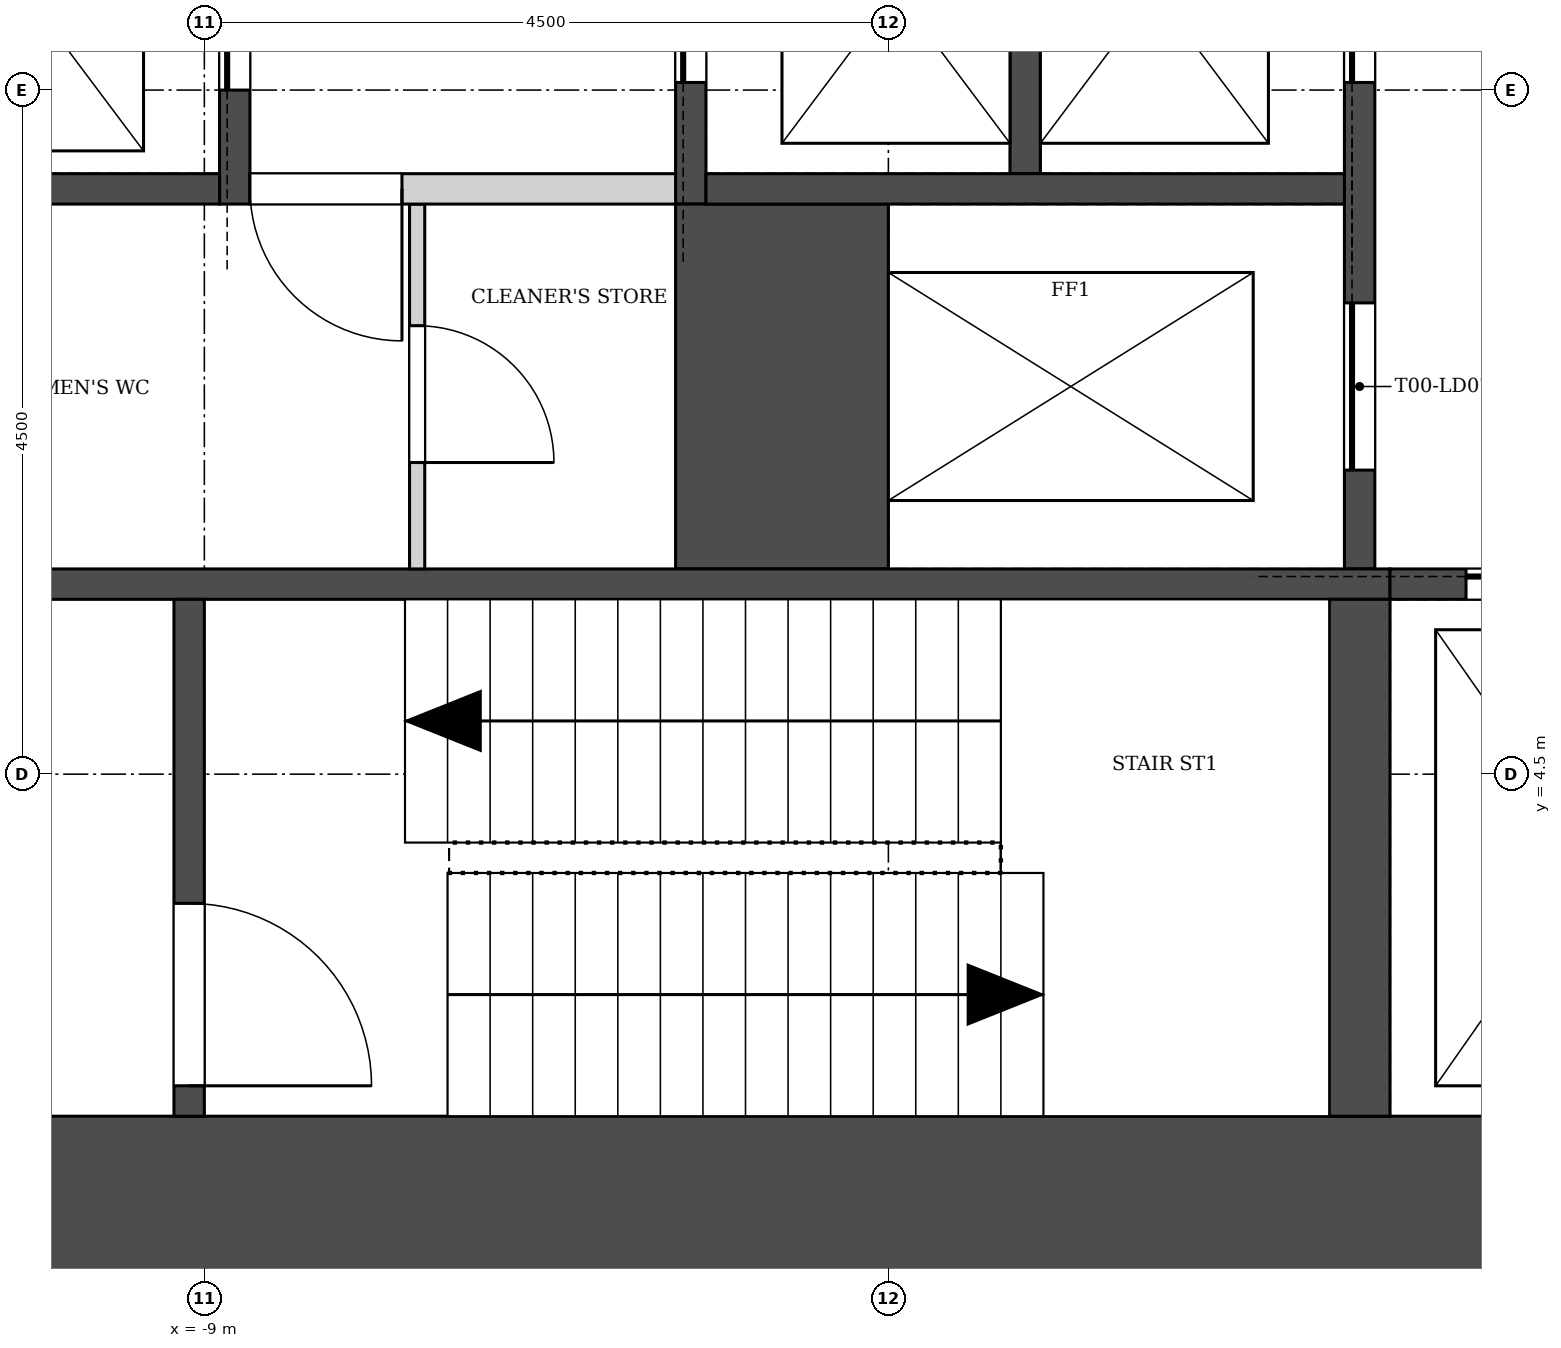
"""IFC4 building model, lengths in metres.
Left out: names, types, materials, properties, quantities, classifications, styles, units other than length and angle.
Written with IfcOpenShell. Run it as: python <this file> out.ifc"""

import sys

from ifc_helpers import new_model, si_unit, direction, frame, frame_2d, origin, place, context, subcontext, project, spatial, rectangle, extrude, element, fill, save


model = new_model("IFC4")
c1 = context("Model", 3, precision=1e-05, world=origin(), true_north=direction((0.0, 1.0)))
c2 = subcontext(c1, "Body", "Model", "MODEL_VIEW")
j1 = project(units=[si_unit("LENGTHUNIT", "METRE"), si_unit("PLANEANGLEUNIT", "RADIAN")], contexts=[c1])
p1 = place(None, origin())
s1 = spatial("IfcSite", under=j1, at=p1, CompositionType="ELEMENT")
p2 = place(p1, origin())
s2 = spatial("IfcBuilding", under=s1, at=p2, CompositionType="ELEMENT")
p3 = place(p2, frame((0.0, 0.0, 25.0)))
s3 = spatial("IfcBuildingStorey", under=s2, at=p3, CompositionType="ELEMENT", Elevation=25.0)
p4 = place(p3, frame((-14.0, 1.55, 0.0), z_axis=(0.0, 0.0, 1.0), x_axis=(1.0, 0.0, 0.0)))
e1 = element("IfcWall", 1, at=p4, inside=s3, PredefinedType="SHEAR", context=c2, shape_type="SweptSolid", body=[
    extrude(rectangle(XDim=28.0, YDim=1.4, at=frame_2d((14.0, 0.0))), origin(), (0.0, 0.0, 1.0), 4.5),
])
p5 = place(p3, frame((-4.353, 56.207, 0.0), z_axis=(0.0, 0.0, 1.0), x_axis=(-0.500000836325, -0.866024920931, 0.0)))
e2 = element("IfcWall", 2, at=p5, inside=s3, PredefinedType="SOLIDWALL", context=c2, shape_type="SweptSolid", body=[
    extrude(rectangle(XDim=56.0, YDim=0.34, at=frame_2d((28.0, 0.0))), origin(), (0.0, 0.0, 1.0), 4.2),
])
p6 = place(p5, frame((1.5, 0.0, 0.9)))
e3 = element("IfcOpeningElement", 3, at=p6, cuts=e2, PredefinedType="OPENING", context=c2, shape_type="SweptSolid", body=[
    extrude(rectangle(XDim=1.885, YDim=3.0, at=frame_2d((0.942, 1.5))), frame((0.0, 0.18, 0.0), z_axis=(0.0, -1.0, 0.0), x_axis=(1.0, 0.0, 0.0)), (0.0, 0.0, 1.0), 0.36),
])
p7 = place(p5, frame((4.5, 0.0, 0.9)))
e4 = element("IfcOpeningElement", 4, at=p7, cuts=e2, PredefinedType="OPENING", context=c2, shape_type="SweptSolid", body=[
    extrude(rectangle(XDim=1.885, YDim=3.0, at=frame_2d((0.942, 1.5))), frame((0.0, 0.18, 0.0), z_axis=(0.0, -1.0, 0.0), x_axis=(1.0, 0.0, 0.0)), (0.0, 0.0, 1.0), 0.36),
])
p8 = place(p5, frame((7.5, 0.0, 0.9)))
e5 = element("IfcOpeningElement", 5, at=p8, cuts=e2, PredefinedType="OPENING", context=c2, shape_type="SweptSolid", body=[
    extrude(rectangle(XDim=1.885, YDim=3.0, at=frame_2d((0.942, 1.5))), frame((0.0, 0.18, 0.0), z_axis=(0.0, -1.0, 0.0), x_axis=(1.0, 0.0, 0.0)), (0.0, 0.0, 1.0), 0.36),
])
p9 = place(p5, frame((10.5, 0.0, 0.9)))
e6 = element("IfcOpeningElement", 6, at=p9, cuts=e2, PredefinedType="OPENING", context=c2, shape_type="SweptSolid", body=[
    extrude(rectangle(XDim=1.885, YDim=3.0, at=frame_2d((0.942, 1.5))), frame((0.0, 0.18, 0.0), z_axis=(0.0, -1.0, 0.0), x_axis=(1.0, 0.0, 0.0)), (0.0, 0.0, 1.0), 0.36),
])
p10 = place(p5, frame((13.5, 0.0, 0.9)))
e7 = element("IfcOpeningElement", 7, at=p10, cuts=e2, PredefinedType="OPENING", context=c2, shape_type="SweptSolid", body=[
    extrude(rectangle(XDim=1.885, YDim=3.0, at=frame_2d((0.942, 1.5))), frame((0.0, 0.18, 0.0), z_axis=(0.0, -1.0, 0.0), x_axis=(1.0, 0.0, 0.0)), (0.0, 0.0, 1.0), 0.36),
])
p11 = place(p5, frame((16.5, 0.0, 0.9)))
e8 = element("IfcOpeningElement", 8, at=p11, cuts=e2, PredefinedType="OPENING", context=c2, shape_type="SweptSolid", body=[
    extrude(rectangle(XDim=1.885, YDim=3.0, at=frame_2d((0.942, 1.5))), frame((0.0, 0.18, 0.0), z_axis=(0.0, -1.0, 0.0), x_axis=(1.0, 0.0, 0.0)), (0.0, 0.0, 1.0), 0.36),
])
p12 = place(p5, frame((19.5, 0.0, 0.9)))
e9 = element("IfcOpeningElement", 9, at=p12, cuts=e2, PredefinedType="OPENING", context=c2, shape_type="SweptSolid", body=[
    extrude(rectangle(XDim=1.885, YDim=3.0, at=frame_2d((0.942, 1.5))), frame((0.0, 0.18, 0.0), z_axis=(0.0, -1.0, 0.0), x_axis=(1.0, 0.0, 0.0)), (0.0, 0.0, 1.0), 0.36),
])
p13 = place(p5, frame((22.5, 0.0, 0.9)))
e10 = element("IfcOpeningElement", 10, at=p13, cuts=e2, PredefinedType="OPENING", context=c2, shape_type="SweptSolid", body=[
    extrude(rectangle(XDim=1.885, YDim=3.0, at=frame_2d((0.942, 1.5))), frame((0.0, 0.18, 0.0), z_axis=(0.0, -1.0, 0.0), x_axis=(1.0, 0.0, 0.0)), (0.0, 0.0, 1.0), 0.36),
])
p14 = place(p5, frame((25.5, 0.0, 0.0)))
e11 = element("IfcOpeningElement", 11, at=p14, cuts=e2, PredefinedType="OPENING", context=c2, shape_type="SweptSolid", body=[
    extrude(rectangle(XDim=1.885, YDim=2.6, at=frame_2d((0.942, 1.3))), frame((0.0, 0.18, 0.0), z_axis=(0.0, -1.0, 0.0), x_axis=(1.0, 0.0, 0.0)), (0.0, 0.0, 1.0), 0.36),
])
p15 = place(p5, frame((28.5, 0.0, 0.9)))
e12 = element("IfcOpeningElement", 12, at=p15, cuts=e2, PredefinedType="OPENING", context=c2, shape_type="SweptSolid", body=[
    extrude(rectangle(XDim=1.885, YDim=3.0, at=frame_2d((0.942, 1.5))), frame((0.0, 0.18, 0.0), z_axis=(0.0, -1.0, 0.0), x_axis=(1.0, 0.0, 0.0)), (0.0, 0.0, 1.0), 0.36),
])
p16 = place(p5, frame((31.5, 0.0, 0.9)))
e13 = element("IfcOpeningElement", 13, at=p16, cuts=e2, PredefinedType="OPENING", context=c2, shape_type="SweptSolid", body=[
    extrude(rectangle(XDim=1.885, YDim=3.0, at=frame_2d((0.942, 1.5))), frame((0.0, 0.18, 0.0), z_axis=(0.0, -1.0, 0.0), x_axis=(1.0, 0.0, 0.0)), (0.0, 0.0, 1.0), 0.36),
])
p17 = place(p5, frame((34.5, 0.0, 0.9)))
e14 = element("IfcOpeningElement", 14, at=p17, cuts=e2, PredefinedType="OPENING", context=c2, shape_type="SweptSolid", body=[
    extrude(rectangle(XDim=1.885, YDim=3.0, at=frame_2d((0.942, 1.5))), frame((0.0, 0.18, 0.0), z_axis=(0.0, -1.0, 0.0), x_axis=(1.0, 0.0, 0.0)), (0.0, 0.0, 1.0), 0.36),
])
p18 = place(p5, frame((37.5, 0.0, 0.9)))
e15 = element("IfcOpeningElement", 15, at=p18, cuts=e2, PredefinedType="OPENING", context=c2, shape_type="SweptSolid", body=[
    extrude(rectangle(XDim=1.885, YDim=3.0, at=frame_2d((0.942, 1.5))), frame((0.0, 0.18, 0.0), z_axis=(0.0, -1.0, 0.0), x_axis=(1.0, 0.0, 0.0)), (0.0, 0.0, 1.0), 0.36),
])
p19 = place(p5, frame((40.5, 0.0, 0.9)))
e16 = element("IfcOpeningElement", 16, at=p19, cuts=e2, PredefinedType="OPENING", context=c2, shape_type="SweptSolid", body=[
    extrude(rectangle(XDim=1.885, YDim=3.0, at=frame_2d((0.942, 1.5))), frame((0.0, 0.18, 0.0), z_axis=(0.0, -1.0, 0.0), x_axis=(1.0, 0.0, 0.0)), (0.0, 0.0, 1.0), 0.36),
])
p20 = place(p5, frame((43.5, 0.0, 0.9)))
e17 = element("IfcOpeningElement", 17, at=p20, cuts=e2, PredefinedType="OPENING", context=c2, shape_type="SweptSolid", body=[
    extrude(rectangle(XDim=1.885, YDim=3.0, at=frame_2d((0.942, 1.5))), frame((0.0, 0.18, 0.0), z_axis=(0.0, -1.0, 0.0), x_axis=(1.0, 0.0, 0.0)), (0.0, 0.0, 1.0), 0.36),
])
p21 = place(p5, frame((46.5, 0.0, 0.9)))
e18 = element("IfcOpeningElement", 18, at=p21, cuts=e2, PredefinedType="OPENING", context=c2, shape_type="SweptSolid", body=[
    extrude(rectangle(XDim=1.885, YDim=3.0, at=frame_2d((0.942, 1.5))), frame((0.0, 0.18, 0.0), z_axis=(0.0, -1.0, 0.0), x_axis=(1.0, 0.0, 0.0)), (0.0, 0.0, 1.0), 0.36),
])
p22 = place(p5, frame((49.5, 0.0, 0.9)))
e19 = element("IfcOpeningElement", 19, at=p22, cuts=e2, PredefinedType="OPENING", context=c2, shape_type="SweptSolid", body=[
    extrude(rectangle(XDim=1.885, YDim=3.0, at=frame_2d((0.942, 1.5))), frame((0.0, 0.18, 0.0), z_axis=(0.0, -1.0, 0.0), x_axis=(1.0, 0.0, 0.0)), (0.0, 0.0, 1.0), 0.36),
])
p23 = place(p5, frame((52.5, 0.0, 0.9)))
e20 = element("IfcOpeningElement", 20, at=p23, cuts=e2, PredefinedType="OPENING", context=c2, shape_type="SweptSolid", body=[
    extrude(rectangle(XDim=1.885, YDim=3.0, at=frame_2d((0.942, 1.5))), frame((0.0, 0.18, 0.0), z_axis=(0.0, -1.0, 0.0), x_axis=(1.0, 0.0, 0.0)), (0.0, 0.0, 1.0), 0.36),
])
p24 = place(p3, frame((-8.8, 8.25, -2.0), z_axis=(0.0, 0.0, 1.0), x_axis=(0.0, 1.0, 0.0)))
e21 = element("IfcWall", 21, at=p24, inside=s3, PredefinedType="SOLIDWALL", context=c2, shape_type="SweptSolid", body=[
    extrude(rectangle(XDim=5.2, YDim=0.2, at=frame_2d((2.6, 0.0))), origin(), (0.0, 0.0, 1.0), 6.2),
])
p25 = place(p24, frame((0.75, 0.0, 2.0)))
e22 = element("IfcOpeningElement", 22, at=p25, cuts=e21, PredefinedType="OPENING", context=c2, shape_type="SweptSolid", body=[
    extrude(rectangle(XDim=1.2, YDim=2.1, at=frame_2d((0.6, 1.05))), frame((0.0, 0.11, 0.0), z_axis=(0.0, -1.0, 0.0), x_axis=(1.0, 0.0, 0.0)), (0.0, 0.0, 1.0), 0.22),
])
p26 = place(p24, frame((3.25, 0.0, 2.0)))
e23 = element("IfcOpeningElement", 23, at=p26, cuts=e21, PredefinedType="OPENING", context=c2, shape_type="SweptSolid", body=[
    extrude(rectangle(XDim=1.2, YDim=2.1, at=frame_2d((0.6, 1.05))), frame((0.0, 0.11, 0.0), z_axis=(0.0, -1.0, 0.0), x_axis=(1.0, 0.0, 0.0)), (0.0, 0.0, 1.0), 0.22),
])
p27 = place(p3, frame((-5.8, 8.25, -2.0), z_axis=(0.0, 0.0, 1.0), x_axis=(0.0, 1.0, 0.0)))
e24 = element("IfcWall", 24, at=p27, inside=s3, PredefinedType="SOLIDWALL", context=c2, shape_type="SweptSolid", body=[
    extrude(rectangle(XDim=8.0, YDim=0.2, at=frame_2d((4.0, 0.0))), origin(), (0.0, 0.0, 1.0), 6.2),
])
p28 = place(p27, frame((0.8, 0.0, 2.0)))
e25 = element("IfcOpeningElement", 25, at=p28, cuts=e24, PredefinedType="OPENING", context=c2, shape_type="SweptSolid", body=[
    extrude(rectangle(XDim=1.2, YDim=2.1, at=frame_2d((0.6, 1.05))), frame((0.0, 0.11, 0.0), z_axis=(0.0, -1.0, 0.0), x_axis=(1.0, 0.0, 0.0)), (0.0, 0.0, 1.0), 0.22),
])
p29 = place(p27, frame((3.4, 0.0, 2.0)))
e26 = element("IfcOpeningElement", 26, at=p29, cuts=e24, PredefinedType="OPENING", context=c2, shape_type="SweptSolid", body=[
    extrude(rectangle(XDim=1.2, YDim=2.1, at=frame_2d((0.6, 1.05))), frame((0.0, 0.11, 0.0), z_axis=(0.0, -1.0, 0.0), x_axis=(1.0, 0.0, 0.0)), (0.0, 0.0, 1.0), 0.22),
])
p30 = place(p27, frame((6.0, 0.0, 2.0)))
e27 = element("IfcOpeningElement", 27, at=p30, cuts=e24, PredefinedType="OPENING", context=c2, shape_type="SweptSolid", body=[
    extrude(rectangle(XDim=1.2, YDim=2.1, at=frame_2d((0.6, 1.05))), frame((0.0, 0.11, 0.0), z_axis=(0.0, -1.0, 0.0), x_axis=(1.0, 0.0, 0.0)), (0.0, 0.0, 1.0), 0.22),
])
p31 = place(p3, frame((-3.6, 8.45, -2.0), z_axis=(0.0, 0.0, 1.0), x_axis=(0.0, 1.0, 0.0)))
e28 = element("IfcWall", 28, at=p31, inside=s3, PredefinedType="SOLIDWALL", context=c2, shape_type="SweptSolid", body=[
    extrude(rectangle(XDim=7.8, YDim=0.2, at=frame_2d((3.9, 0.0))), origin(), (0.0, 0.0, 1.0), 6.2),
])
p32 = place(p3, frame((-1.4, 5.85, -2.0), z_axis=(0.0, 0.0, 1.0), x_axis=(0.0, 1.0, 0.0)))
e29 = element("IfcWall", 29, at=p32, inside=s3, PredefinedType="SOLIDWALL", context=c2, shape_type="SweptSolid", body=[
    extrude(rectangle(XDim=11.75, YDim=0.2, at=frame_2d((5.875, 0.0))), origin(), (0.0, 0.0, 1.0), 6.2),
])
p33 = place(p32, frame((3.2, 0.0, 2.0)))
e30 = element("IfcOpeningElement", 30, at=p33, cuts=e29, PredefinedType="OPENING", context=c2, shape_type="SweptSolid", body=[
    extrude(rectangle(XDim=1.2, YDim=2.1, at=frame_2d((0.6, 1.05))), frame((0.0, 0.11, 0.0), z_axis=(0.0, -1.0, 0.0), x_axis=(1.0, 0.0, 0.0)), (0.0, 0.0, 1.0), 0.22),
])
p34 = place(p32, frame((0.65, 0.0, 2.0)))
e31 = element("IfcOpeningElement", 31, at=p34, cuts=e29, PredefinedType="OPENING", context=c2, shape_type="SweptSolid", body=[
    extrude(rectangle(XDim=1.1, YDim=2.1, at=frame_2d((0.55, 1.05))), frame((0.0, 0.11, 0.0), z_axis=(0.0, -1.0, 0.0), x_axis=(1.0, 0.0, 0.0)), (0.0, 0.0, 1.0), 0.22),
])
p35 = place(p3, frame((-5.2, 5.85, -2.0), z_axis=(0.0, 0.0, 1.0), x_axis=(0.0, 1.0, 0.0)))
e32 = element("IfcWall", 32, at=p35, inside=s3, PredefinedType="SOLIDWALL", context=c2, shape_type="SweptSolid", body=[
    extrude(rectangle(XDim=2.4, YDim=1.4, at=frame_2d((1.2, 0.0))), origin(), (0.0, 0.0, 1.0), 6.2),
])
p36 = place(p3, frame((-10.9, 8.35, -2.0), z_axis=(0.0, 0.0, 1.0), x_axis=(1.0, 0.0, 0.0)))
e33 = element("IfcWall", 33, at=p36, inside=s3, PredefinedType="SOLIDWALL", context=c2, shape_type="SweptSolid", body=[
    extrude(rectangle(XDim=2.0, YDim=0.2, at=frame_2d((1.0, 0.0))), origin(), (0.0, 0.0, 1.0), 6.2),
])
p37 = place(p3, frame((-5.7, 8.35, -2.0), z_axis=(0.0, 0.0, 1.0), x_axis=(1.0, 0.0, 0.0)))
e34 = element("IfcWall", 34, at=p37, inside=s3, PredefinedType="SOLIDWALL", context=c2, shape_type="SweptSolid", body=[
    extrude(rectangle(XDim=4.2, YDim=0.2, at=frame_2d((2.1, 0.0))), origin(), (0.0, 0.0, 1.0), 6.2),
])
p38 = place(p3, frame((-12.6, 5.75, -2.0), z_axis=(0.0, 0.0, 1.0), x_axis=(1.0, 0.0, 0.0)))
e35 = element("IfcWall", 35, at=p38, inside=s3, PredefinedType="SOLIDWALL", context=c2, shape_type="SweptSolid", body=[
    extrude(rectangle(XDim=11.4, YDim=0.2, at=frame_2d((5.7, 0.0))), origin(), (0.0, 0.0, 1.0), 6.2),
])
p39 = place(p3, frame((-1.2, 5.75, -2.0), z_axis=(0.0, 0.0, 1.0), x_axis=(1.0, 0.0, 0.0)))
e36 = element("IfcWall", 36, at=p39, inside=s3, PredefinedType="SOLIDWALL", context=c2, shape_type="SweptSolid", body=[
    extrude(rectangle(XDim=2.4, YDim=0.2, at=frame_2d((1.2, 0.0))), origin(), (0.0, 0.0, 1.0), 6.2),
])
p40 = place(p39, frame((0.5, 0.0, 2.0)))
e37 = element("IfcOpeningElement", 37, at=p40, cuts=e36, PredefinedType="OPENING", context=c2, shape_type="SweptSolid", body=[
    extrude(rectangle(XDim=1.4, YDim=2.1, at=frame_2d((0.7, 1.05))), frame((0.0, 0.11, 0.0), z_axis=(0.0, -1.0, 0.0), x_axis=(1.0, 0.0, 0.0)), (0.0, 0.0, 1.0), 0.22),
])
p41 = place(p3, frame((-9.1, 2.25, -2.0), z_axis=(0.0, 0.0, 1.0), x_axis=(0.0, 1.0, 0.0)))
e38 = element("IfcWall", 38, at=p41, inside=s3, PredefinedType="SOLIDWALL", context=c2, shape_type="SweptSolid", body=[
    extrude(rectangle(XDim=3.4, YDim=0.2, at=frame_2d((1.7, 0.0))), origin(), (0.0, 0.0, 1.0), 6.2),
])
p42 = place(p41, frame((0.2, 0.0, 2.0)))
e39 = element("IfcOpeningElement", 39, at=p42, cuts=e38, PredefinedType="OPENING", context=c2, shape_type="SweptSolid", body=[
    extrude(rectangle(XDim=1.2, YDim=2.1, at=frame_2d((0.6, 1.05))), frame((0.0, 0.11, 0.0), z_axis=(0.0, -1.0, 0.0), x_axis=(1.0, 0.0, 0.0)), (0.0, 0.0, 1.0), 0.22),
])
p43 = place(p3, frame((-1.4, 2.25, -2.0), z_axis=(0.0, 0.0, 1.0), x_axis=(0.0, 1.0, 0.0)))
e40 = element("IfcWall", 40, at=p43, inside=s3, PredefinedType="SOLIDWALL", context=c2, shape_type="SweptSolid", body=[
    extrude(rectangle(XDim=3.4, YDim=0.4, at=frame_2d((1.7, 0.0))), origin(), (0.0, 0.0, 1.0), 6.2),
])
p44 = place(p3, frame((-7.6, 5.85, 0.0), z_axis=(0.0, 0.0, 1.0), x_axis=(0.0, 1.0, 0.0)))
e41 = element("IfcWall", 41, at=p44, inside=s3, PredefinedType="PARTITIONING", context=c2, shape_type="SweptSolid", body=[
    extrude(rectangle(XDim=2.4, YDim=0.1, at=frame_2d((1.2, 0.0))), origin(), (0.0, 0.0, 1.0), 4.2),
])
p45 = place(p44, frame((0.7, 0.0, 0.0)))
e42 = element("IfcOpeningElement", 42, at=p45, cuts=e41, PredefinedType="OPENING", context=c2, shape_type="SweptSolid", body=[
    extrude(rectangle(XDim=0.9, YDim=2.1, at=frame_2d((0.45, 1.05))), frame((0.0, 0.06, 0.0), z_axis=(0.0, -1.0, 0.0), x_axis=(1.0, 0.0, 0.0)), (0.0, 0.0, 1.0), 0.12),
])
p46 = place(p3, frame((-8.7, 8.35, 0.0), z_axis=(0.0, 0.0, 1.0), x_axis=(1.0, 0.0, 0.0)))
e43 = element("IfcWall", 43, at=p46, inside=s3, PredefinedType="SOLIDWALL", context=c2, shape_type="SweptSolid", body=[
    extrude(rectangle(XDim=2.8, YDim=0.2, at=frame_2d((1.4, 0.0))), origin(), (0.0, 0.0, 1.0), 4.2),
])
p47 = place(p46, origin())
e44 = element("IfcOpeningElement", 44, at=p47, cuts=e43, PredefinedType="OPENING", context=c2, shape_type="SweptSolid", body=[
    extrude(rectangle(XDim=1.0, YDim=2.1, at=frame_2d((0.5, 1.05))), frame((0.0, 0.11, 0.0), z_axis=(0.0, -1.0, 0.0), x_axis=(1.0, 0.0, 0.0)), (0.0, 0.0, 1.0), 0.22),
])
p48 = place(p25, origin())
e45 = element("IfcDoor", 45, at=p48, inside=s3, OperationType="SLIDING_TO_LEFT", PredefinedType="DOOR", context=c2, shape_type="SweptSolid", body=[
    extrude(rectangle(XDim=1.2, YDim=2.1, at=frame_2d((0.6, 1.05))), frame((0.0, 0.025, 0.0), z_axis=(0.0, -1.0, 0.0), x_axis=(1.0, 0.0, 0.0)), (0.0, 0.0, 1.0), 0.05),
])
fill(e22, e45)
p49 = place(p28, origin())
e46 = element("IfcDoor", 46, at=p49, inside=s3, OperationType="SLIDING_TO_LEFT", PredefinedType="DOOR", context=c2, shape_type="SweptSolid", body=[
    extrude(rectangle(XDim=1.2, YDim=2.1, at=frame_2d((0.6, 1.05))), frame((0.0, 0.025, 0.0), z_axis=(0.0, -1.0, 0.0), x_axis=(1.0, 0.0, 0.0)), (0.0, 0.0, 1.0), 0.05),
])
fill(e25, e46)
p50 = place(p33, origin())
e47 = element("IfcDoor", 47, at=p50, inside=s3, OperationType="SLIDING_TO_LEFT", PredefinedType="DOOR", context=c2, shape_type="SweptSolid", body=[
    extrude(rectangle(XDim=1.2, YDim=2.1, at=frame_2d((0.6, 1.05))), frame((0.0, 0.025, 0.0), z_axis=(0.0, -1.0, 0.0), x_axis=(1.0, 0.0, 0.0)), (0.0, 0.0, 1.0), 0.05),
])
fill(e30, e47)
p51 = place(p34, origin())
e48 = element("IfcDoor", 48, at=p51, inside=s3, OperationType="SLIDING_TO_RIGHT", PredefinedType="DOOR", context=c2, shape_type="SweptSolid", body=[
    extrude(rectangle(XDim=1.1, YDim=2.1, at=frame_2d((0.55, 1.05))), frame((0.0, 0.025, 0.0), z_axis=(0.0, -1.0, 0.0), x_axis=(1.0, 0.0, 0.0)), (0.0, 0.0, 1.0), 0.05),
])
fill(e31, e48)
p52 = place(p40, origin())
e49 = element("IfcDoor", 49, at=p52, inside=s3, OperationType="SLIDING_TO_LEFT", PredefinedType="DOOR", context=c2, shape_type="SweptSolid", body=[
    extrude(rectangle(XDim=1.4, YDim=2.1, at=frame_2d((0.7, 1.05))), frame((0.0, 0.025, 0.0), z_axis=(0.0, -1.0, 0.0), x_axis=(1.0, 0.0, 0.0)), (0.0, 0.0, 1.0), 0.05),
])
fill(e37, e49)
p53 = place(p47, frame((1.0, 0.0, 0.0), z_axis=(0.0, 0.0, 1.0), x_axis=(-1.0, 0.0, 0.0)))
e50 = element("IfcDoor", 50, at=p53, inside=s3, OperationType="SINGLE_SWING_LEFT", PredefinedType="DOOR", context=c2, shape_type="SweptSolid", body=[
    extrude(rectangle(XDim=1.0, YDim=2.1, at=frame_2d((0.5, 1.05))), frame((0.0, 0.025, 0.0), z_axis=(0.0, -1.0, 0.0), x_axis=(1.0, 0.0, 0.0)), (0.0, 0.0, 1.0), 0.05),
])
fill(e44, e50)
p54 = place(p45, frame((0.9, 0.0, 0.0), z_axis=(0.0, 0.0, 1.0), x_axis=(-1.0, 0.0, 0.0)))
e51 = element("IfcDoor", 51, at=p54, inside=s3, OperationType="SINGLE_SWING_RIGHT", PredefinedType="DOOR", context=c2, shape_type="SweptSolid", body=[
    extrude(rectangle(XDim=0.9, YDim=2.1, at=frame_2d((0.45, 1.05))), frame((0.0, 0.025, 0.0), z_axis=(0.0, -1.0, 0.0), x_axis=(1.0, 0.0, 0.0)), (0.0, 0.0, 1.0), 0.05),
])
fill(e42, e51)
p55 = place(p42, frame((1.2, 0.0, 0.0), z_axis=(0.0, 0.0, 1.0), x_axis=(-1.0, 0.0, 0.0)))
e52 = element("IfcDoor", 52, at=p55, inside=s3, OperationType="SINGLE_SWING_RIGHT", PredefinedType="DOOR", context=c2, shape_type="SweptSolid", body=[
    extrude(rectangle(XDim=1.2, YDim=2.1, at=frame_2d((0.6, 1.05))), frame((0.0, 0.025, 0.0), z_axis=(0.0, -1.0, 0.0), x_axis=(1.0, 0.0, 0.0)), (0.0, 0.0, 1.0), 0.05),
])
fill(e39, e52)
save(model, sys.argv[1])
